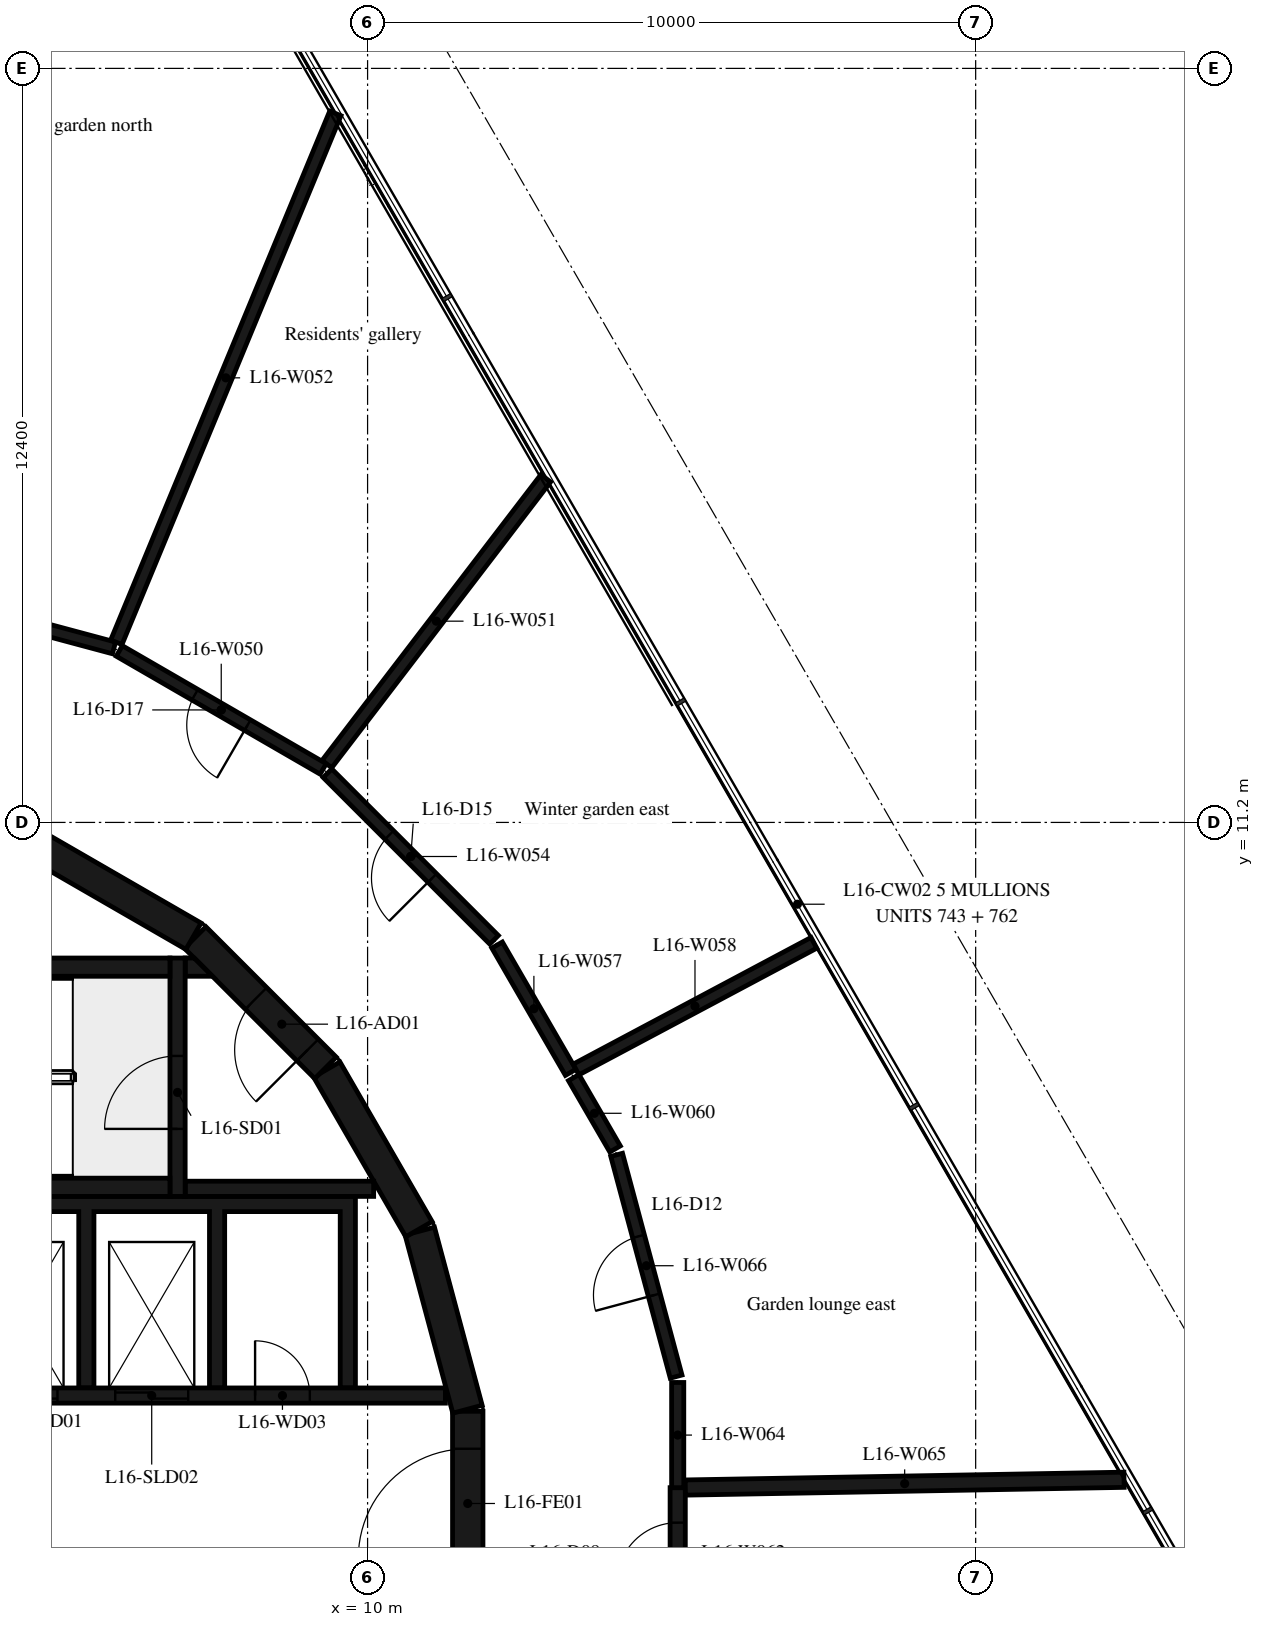
"""IFC4 building model, lengths in metres.
Left out: names, types, materials, properties, quantities, classifications, styles, units other than length and angle.
Written with IfcOpenShell. Run it as: python <this file> out.ifc"""

import sys

from ifc_helpers import new_model, si_unit, direction, frame, frame_2d, origin, place, context, subcontext, project, spatial, polyline, rectangle, outline, extrude, element, fill, save


model = new_model("IFC4")
c1 = context("Model", 3, precision=1e-05, world=origin(), true_north=direction((0.0, 1.0)))
c2 = subcontext(c1, "Body", "Model", "MODEL_VIEW")
j1 = project(units=[si_unit("LENGTHUNIT", "METRE"), si_unit("PLANEANGLEUNIT", "RADIAN")], contexts=[c1])
p1 = place(None, origin())
s1 = spatial("IfcSite", under=j1, at=p1, CompositionType="ELEMENT")
p2 = place(p1, origin())
s2 = spatial("IfcBuilding", under=s1, at=p2, CompositionType="ELEMENT")
p3 = place(p2, frame((0.0, 0.0, 69.9)))
s3 = spatial("IfcBuildingStorey", under=s2, at=p3, CompositionType="ELEMENT", Elevation=69.9)
p4 = place(p3, frame((11.647, -1.516, 0.0), z_axis=(0.0, 0.0, 1.0), x_axis=(0.0, 1.0, 0.0)))
e1 = element("IfcWall", 1, at=p4, inside=s3, PredefinedType="SHEAR", context=c2, shape_type="SweptSolid", body=[
    extrude(rectangle(XDim=3.033, YDim=0.5, at=frame_2d((1.516, 0.0))), origin(), (0.0, 0.0, 1.0), 6.35),
])
p5 = place(p4, frame((0.616, 0.0, 0.0)))
e2 = element("IfcOpeningElement", 2, at=p5, cuts=e1, PredefinedType="OPENING", context=c2, shape_type="SweptSolid", body=[
    extrude(rectangle(XDim=1.8, YDim=2.1, at=frame_2d((0.9, 1.05))), frame((0.0, 0.26, 0.0), z_axis=(0.0, -1.0, 0.0), x_axis=(1.0, 0.0, 0.0)), (0.0, 0.0, 1.0), 0.52),
])
for number, where, z_axis, x_axis in (
    (3, (11.643, 1.55, 0.0), (0.0, 0.0, 1.0), (-0.259, 0.966, 0.0)),
    (4, (10.845, 4.51, 0.0), (0.0, 0.0, 1.0), (-0.5, 0.866, 0.0)),
):
    element("IfcWall", number, at=place(p3, frame(where, z_axis=z_axis, x_axis=x_axis)), inside=s3, PredefinedType="SHEAR", context=c2, shape_type="SweptSolid", body=[
        extrude(rectangle(XDim=3.033, YDim=0.5, at=frame_2d((1.516, 0.0))), origin(), (0.0, 0.0, 1.0), 6.35),
    ])
p6 = place(p3, frame((9.308, 7.164, 0.0), z_axis=(0.0, 0.0, 1.0), x_axis=(-0.707106781187, 0.707106781187, 0.0)))
e5 = element("IfcWall", 5, at=p6, inside=s3, PredefinedType="SHEAR", context=c2, shape_type="SweptSolid", body=[
    extrude(rectangle(XDim=3.032, YDim=0.5, at=frame_2d((1.516, 0.0))), origin(), (0.0, 0.0, 1.0), 6.35),
])
p7 = place(p6, frame((0.416, 0.0, 0.0)))
e6 = element("IfcOpeningElement", 6, at=p7, cuts=e5, PredefinedType="OPENING", context=c2, shape_type="SweptSolid", body=[
    extrude(rectangle(XDim=1.2, YDim=2.1, at=frame_2d((0.6, 1.05))), frame((0.0, 0.26, 0.0), z_axis=(0.0, -1.0, 0.0), x_axis=(1.0, 0.0, 0.0)), (0.0, 0.0, 1.0), 0.52),
])
p8 = place(p3, frame((7.137, 9.329, 0.0), z_axis=(0.0, 0.0, 1.0), x_axis=(-0.865975092491, 0.500087131594, 0.0)))
e7 = element("IfcWall", 7, at=p8, inside=s3, PredefinedType="SHEAR", context=c2, shape_type="SweptSolid", body=[
    extrude(rectangle(XDim=3.033, YDim=0.5, at=frame_2d((1.516, 0.0))), origin(), (0.0, 0.0, 1.0), 6.35),
])
for number, where, z_axis, x_axis in (
    (8, (0.0, 5.2, 0.0), (0.0, 0.0, 1.0), (1.0, 0.0, 0.0)),
    (9, (0.0, 8.82, 0.0), (0.0, 0.0, 1.0), (1.0, 0.0, 0.0)),
):
    element("IfcWall", number, at=place(p3, frame(where, z_axis=z_axis, x_axis=x_axis)), inside=s3, PredefinedType="SHEAR", context=c2, shape_type="SweptSolid", body=[
        extrude(rectangle(XDim=6.75, YDim=0.3, at=frame_2d((3.375, 0.0))), origin(), (0.0, 0.0, 1.0), 6.35),
    ])
p9 = place(p3, frame((6.875, 5.05, 0.0), z_axis=(0.0, 0.0, 1.0), x_axis=(0.0, 1.0, 0.0)))
e10 = element("IfcWall", 10, at=p9, inside=s3, PredefinedType="SHEAR", context=c2, shape_type="SweptSolid", body=[
    extrude(rectangle(XDim=3.92, YDim=0.25, at=frame_2d((1.96, 0.0))), origin(), (0.0, 0.0, 1.0), 6.35),
])
p10 = place(p9, frame((1.11, 0.0, 0.0)))
e11 = element("IfcOpeningElement", 11, at=p10, cuts=e10, PredefinedType="OPENING", context=c2, shape_type="SweptSolid", body=[
    extrude(rectangle(XDim=1.2, YDim=2.1, at=frame_2d((0.6, 1.05))), frame((0.0, 0.135, 0.0), z_axis=(0.0, -1.0, 0.0), x_axis=(1.0, 0.0, 0.0)), (0.0, 0.0, 1.0), 0.27),
])
p11 = place(p3, frame((7.0, 5.175, 0.0), z_axis=(0.0, 0.0, 1.0), x_axis=(1.0, 0.0, 0.0)))
e12 = element("IfcWall", 12, at=p11, inside=s3, PredefinedType="SHEAR", context=c2, shape_type="SweptSolid", body=[
    extrude(rectangle(XDim=3.1, YDim=0.25, at=frame_2d((1.55, 0.0))), origin(), (0.0, 0.0, 1.0), 6.35),
])
p12 = place(p3, origin())
e13 = element("IfcWall", 13, at=p12, inside=s3, PredefinedType="SHEAR", context=c2, shape_type="SweptSolid", body=[
    extrude(outline(polyline([(7.448, 8.67), (7.0, 8.67), (7.0, 8.97), (7.148, 8.97), (7.448, 8.67)])), origin(), (0.0, 0.0, 1.0), 6.35),
])
p13 = place(p3, origin())
e14 = element("IfcWall", 14, at=p13, inside=s3, PredefinedType="SHEAR", context=c2, shape_type="SweptSolid", body=[
    extrude(outline(polyline([(-9.55, 4.8), (-7.65, 4.8), (-7.65, 1.9), (-7.4, 1.9), (-7.4, 4.8), (-5.5, 4.8), (-5.5, 1.9), (-5.25, 1.9), (-5.25, 4.8), (-3.35, 4.8), (-3.35, 1.9), (-3.1, 1.9), (-3.1, 4.8), (-1.2, 4.8), (-1.2, 1.9), (-0.95, 1.9), (-0.95, 4.8), (0.95, 4.8), (0.95, 1.9), (1.2, 1.9), (1.2, 4.8), (3.1, 4.8), (3.1, 1.9), (3.35, 1.9), (3.35, 4.8), (5.25, 4.8), (5.25, 1.9), (5.5, 1.9), (5.5, 4.8), (7.4, 4.8), (7.4, 1.9), (7.65, 1.9), (7.65, 4.8), (9.55, 4.8), (9.55, 1.9), (9.8, 1.9), (9.8, 4.8), (9.8, 5.05), (-9.8, 5.05), (-9.8, 4.8), (-9.8, 1.9), (-9.55, 1.9), (-9.55, 4.8)])), origin(), (0.0, 0.0, 1.0), 6.35),
])
p14 = place(p3, frame((3.35, 1.775, 0.0), z_axis=(0.0, 0.0, 1.0), x_axis=(1.0, 0.0, 0.0)))
e15 = element("IfcWall", 15, at=p14, inside=s3, PredefinedType="SHEAR", context=c2, shape_type="SweptSolid", body=[
    extrude(rectangle(XDim=7.93, YDim=0.25, at=frame_2d((3.965, 0.0))), origin(), (0.0, 0.0, 1.0), 6.35),
])
p15 = place(p14, frame((0.35, 0.0, 0.0)))
e16 = element("IfcOpeningElement", 16, at=p15, cuts=e15, PredefinedType="OPENING", context=c2, shape_type="SweptSolid", body=[
    extrude(rectangle(XDim=1.2, YDim=2.4, at=frame_2d((0.6, 1.2))), frame((0.0, 0.135, 0.0), z_axis=(0.0, -1.0, 0.0), x_axis=(1.0, 0.0, 0.0)), (0.0, 0.0, 1.0), 0.27),
])
p16 = place(p14, frame((2.5, 0.0, 0.0)))
e17 = element("IfcOpeningElement", 17, at=p16, cuts=e15, PredefinedType="OPENING", context=c2, shape_type="SweptSolid", body=[
    extrude(rectangle(XDim=1.2, YDim=2.4, at=frame_2d((0.6, 1.2))), frame((0.0, 0.135, 0.0), z_axis=(0.0, -1.0, 0.0), x_axis=(1.0, 0.0, 0.0)), (0.0, 0.0, 1.0), 0.27),
])
p17 = place(p14, frame((4.8, 0.0, 0.0)))
e18 = element("IfcOpeningElement", 18, at=p17, cuts=e15, PredefinedType="OPENING", context=c2, shape_type="SweptSolid", body=[
    extrude(rectangle(XDim=0.9, YDim=2.1, at=frame_2d((0.45, 1.05))), frame((0.0, 0.135, 0.0), z_axis=(0.0, -1.0, 0.0), x_axis=(1.0, 0.0, 0.0)), (0.0, 0.0, 1.0), 0.27),
])
p18 = place(p3, frame((5.83, 14.07, 0.0), z_axis=(0.0, 0.0, 1.0), x_axis=(-0.965870133458, 0.259026804199, 0.0)))
e19 = element("IfcWall", 19, at=p18, inside=s3, PredefinedType="PARTITIONING", context=c2, shape_type="SweptSolid", body=[
    extrude(rectangle(XDim=3.876, YDim=0.2, at=frame_2d((1.938, 0.0))), origin(), (0.0, 0.0, 1.0), 6.35),
])
p19 = place(p18, frame((1.438, 0.0, 0.0)))
e20 = element("IfcOpeningElement", 20, at=p19, cuts=e19, PredefinedType="OPENING", context=c2, shape_type="SweptSolid", body=[
    extrude(rectangle(XDim=1.0, YDim=2.1, at=frame_2d((0.5, 1.05))), frame((0.0, 0.11, 0.0), z_axis=(0.0, -1.0, 0.0), x_axis=(1.0, 0.0, 0.0)), (0.0, 0.0, 1.0), 0.22),
])
p20 = place(p3, frame((9.27, 12.08, 0.0), z_axis=(0.0, 0.0, 1.0), x_axis=(-0.865601686425, 0.500733182901, 0.0)))
e21 = element("IfcWall", 21, at=p20, inside=s3, PredefinedType="PARTITIONING", context=c2, shape_type="SweptSolid", body=[
    extrude(rectangle(XDim=3.874, YDim=0.2, at=frame_2d((1.937, 0.0))), origin(), (0.0, 0.0, 1.0), 6.35),
])
p21 = place(p20, frame((1.437, 0.0, 0.0)))
e22 = element("IfcOpeningElement", 22, at=p21, cuts=e21, PredefinedType="OPENING", context=c2, shape_type="SweptSolid", body=[
    extrude(rectangle(XDim=1.0, YDim=2.1, at=frame_2d((0.5, 1.05))), frame((0.0, 0.11, 0.0), z_axis=(0.0, -1.0, 0.0), x_axis=(1.0, 0.0, 0.0)), (0.0, 0.0, 1.0), 0.22),
])
p22 = place(p3, frame((9.331, 12.159, 0.0), z_axis=(0.0, 0.0, 1.0), x_axis=(0.607927563865, 0.793992491837, 0.0)))
e23 = element("IfcWall", 23, at=p22, inside=s3, PredefinedType="PARTITIONING", context=c2, shape_type="SweptSolid", body=[
    extrude(rectangle(XDim=5.92, YDim=0.2, at=frame_2d((2.96, 0.0))), origin(), (0.0, 0.0, 1.0), 6.35),
])
p23 = place(p3, frame((9.47, 22.86, 0.0), z_axis=(0.0, 0.0, 1.0), x_axis=(-0.382599926304, -0.923914117433, 0.0)))
e24 = element("IfcWall", 24, at=p23, inside=s3, PredefinedType="PARTITIONING", context=c2, shape_type="SweptSolid", body=[
    extrude(rectangle(XDim=9.414, YDim=0.2, at=frame_2d((4.707, 0.0))), origin(), (0.0, 0.0, 1.0), 6.35),
])
p24 = place(p3, frame((12.08, 9.27, 0.0), z_axis=(0.0, 0.0, 1.0), x_axis=(-0.707106781187, 0.707106781187, 0.0)))
e25 = element("IfcWall", 25, at=p24, inside=s3, PredefinedType="PARTITIONING", context=c2, shape_type="SweptSolid", body=[
    extrude(rectangle(XDim=3.874, YDim=0.2, at=frame_2d((1.937, 0.0))), origin(), (0.0, 0.0, 1.0), 6.35),
])
p25 = place(p24, frame((1.437, 0.0, 0.0)))
e26 = element("IfcOpeningElement", 26, at=p25, cuts=e25, PredefinedType="OPENING", context=c2, shape_type="SweptSolid", body=[
    extrude(rectangle(XDim=1.0, YDim=2.1, at=frame_2d((0.5, 1.05))), frame((0.0, 0.11, 0.0), z_axis=(0.0, -1.0, 0.0), x_axis=(1.0, 0.0, 0.0)), (0.0, 0.0, 1.0), 0.22),
])
p26 = place(p3, frame((13.34, 7.09, 0.0), z_axis=(0.0, 0.0, 1.0), x_axis=(-0.500439091614, 0.865771745661, 0.0)))
e27 = element("IfcWall", 27, at=p26, inside=s3, PredefinedType="PARTITIONING", context=c2, shape_type="SweptSolid", body=[
    extrude(rectangle(XDim=2.418, YDim=0.2, at=frame_2d((1.209, 0.0))), origin(), (0.0, 0.0, 1.0), 6.35),
])
p27 = place(p3, frame((13.428, 7.137, 0.0), z_axis=(0.0, 0.0, 1.0), x_axis=(0.882663829621, 0.470004855166, 0.0)))
e28 = element("IfcWall", 28, at=p27, inside=s3, PredefinedType="PARTITIONING", context=c2, shape_type="SweptSolid", body=[
    extrude(rectangle(XDim=4.432, YDim=0.2, at=frame_2d((2.216, 0.0))), origin(), (0.0, 0.0, 1.0), 6.35),
])
p28 = place(p3, frame((14.07, 5.83, 0.0), z_axis=(0.0, 0.0, 1.0), x_axis=(-0.501383964678, 0.865224895599, 0.0)))
e29 = element("IfcWall", 29, at=p28, inside=s3, PredefinedType="PARTITIONING", context=c2, shape_type="SweptSolid", body=[
    extrude(rectangle(XDim=1.356, YDim=0.2, at=frame_2d((0.678, 0.0))), origin(), (0.0, 0.0, 1.0), 6.35),
])
p29 = place(p3, frame((15.1, -1.89, 0.0), z_axis=(0.0, 0.0, 1.0), x_axis=(0.0, 1.0, 0.0)))
e30 = element("IfcWall", 30, at=p29, inside=s3, PredefinedType="PARTITIONING", context=c2, shape_type="SweptSolid", body=[
    extrude(rectangle(XDim=2.15, YDim=0.25, at=frame_2d((1.075, 0.0))), origin(), (0.0, 0.0, 1.0), 6.35),
])
p30 = place(p29, frame((0.575, 0.0, 0.0)))
e31 = element("IfcOpeningElement", 31, at=p30, cuts=e30, PredefinedType="OPENING", context=c2, shape_type="SweptSolid", body=[
    extrude(rectangle(XDim=1.0, YDim=2.1, at=frame_2d((0.5, 1.05))), frame((0.0, 0.135, 0.0), z_axis=(0.0, -1.0, 0.0), x_axis=(1.0, 0.0, 0.0)), (0.0, 0.0, 1.0), 0.27),
])
p31 = place(p3, frame((15.1, 0.26, 0.0), z_axis=(0.0, 0.0, 1.0), x_axis=(0.0, 1.0, 0.0)))
e32 = element("IfcWall", 32, at=p31, inside=s3, PredefinedType="PARTITIONING", context=c2, shape_type="SweptSolid", body=[
    extrude(rectangle(XDim=1.73, YDim=0.2, at=frame_2d((0.865, 0.0))), origin(), (0.0, 0.0, 1.0), 6.35),
])
p32 = place(p3, frame((15.225, 0.262, 0.0), z_axis=(0.0, 0.0, 1.0), x_axis=(0.99984343394, 0.017694846912, 0.0)))
e33 = element("IfcWall", 33, at=p32, inside=s3, PredefinedType="PARTITIONING", context=c2, shape_type="SweptSolid", body=[
    extrude(rectangle(XDim=7.216, YDim=0.25, at=frame_2d((3.608, 0.0))), origin(), (0.0, 0.0, 1.0), 6.35),
])
p33 = place(p3, frame((15.074, 2.087, 0.0), z_axis=(0.0, 0.0, 1.0), x_axis=(-0.259038819442, 0.965866911133, 0.0)))
e34 = element("IfcWall", 34, at=p33, inside=s3, PredefinedType="PARTITIONING", context=c2, shape_type="SweptSolid", body=[
    extrude(rectangle(XDim=3.776, YDim=0.2, at=frame_2d((1.888, 0.0))), origin(), (0.0, 0.0, 1.0), 6.35),
])
p34 = place(p33, frame((1.388, 0.0, 0.0)))
e35 = element("IfcOpeningElement", 35, at=p34, cuts=e34, PredefinedType="OPENING", context=c2, shape_type="SweptSolid", body=[
    extrude(rectangle(XDim=1.0, YDim=2.1, at=frame_2d((0.5, 1.05))), frame((0.0, 0.11, 0.0), z_axis=(0.0, -1.0, 0.0), x_axis=(1.0, 0.0, 0.0)), (0.0, 0.0, 1.0), 0.22),
])
p35 = place(p10, origin())
e36 = element("IfcDoor", 36, at=p35, inside=s3, OperationType="SINGLE_SWING_LEFT", PredefinedType="DOOR", context=c2, shape_type="SweptSolid", body=[
    extrude(rectangle(XDim=1.2, YDim=2.1, at=frame_2d((0.6, 1.05))), frame((0.0, 0.025, 0.0), z_axis=(0.0, -1.0, 0.0), x_axis=(1.0, 0.0, 0.0)), (0.0, 0.0, 1.0), 0.05),
])
fill(e11, e36)
p36 = place(p7, origin())
e37 = element("IfcDoor", 37, at=p36, inside=s3, OperationType="SINGLE_SWING_RIGHT", PredefinedType="DOOR", context=c2, shape_type="SweptSolid", body=[
    extrude(rectangle(XDim=1.2, YDim=2.1, at=frame_2d((0.6, 1.05))), frame((0.0, 0.025, 0.0), z_axis=(0.0, -1.0, 0.0), x_axis=(1.0, 0.0, 0.0)), (0.0, 0.0, 1.0), 0.05),
])
fill(e6, e37)
p37 = place(p5, origin())
e38 = element("IfcDoor", 38, at=p37, inside=s3, OperationType="DOUBLE_DOOR_SINGLE_SWING", PredefinedType="DOOR", context=c2, shape_type="SweptSolid", body=[
    extrude(rectangle(XDim=1.8, YDim=2.1, at=frame_2d((0.9, 1.05))), frame((0.0, 0.025, 0.0), z_axis=(0.0, -1.0, 0.0), x_axis=(1.0, 0.0, 0.0)), (0.0, 0.0, 1.0), 0.05),
])
fill(e2, e38)
p38 = place(p15, origin())
e39 = element("IfcDoor", 39, at=p38, inside=s3, OperationType="DOUBLE_DOOR_SLIDING", PredefinedType="DOOR", context=c2, shape_type="SweptSolid", body=[
    extrude(rectangle(XDim=1.2, YDim=2.4, at=frame_2d((0.6, 1.2))), frame((0.0, 0.025, 0.0), z_axis=(0.0, -1.0, 0.0), x_axis=(1.0, 0.0, 0.0)), (0.0, 0.0, 1.0), 0.05),
])
fill(e16, e39)
p39 = place(p16, origin())
e40 = element("IfcDoor", 40, at=p39, inside=s3, OperationType="DOUBLE_DOOR_SLIDING", PredefinedType="DOOR", context=c2, shape_type="SweptSolid", body=[
    extrude(rectangle(XDim=1.2, YDim=2.4, at=frame_2d((0.6, 1.2))), frame((0.0, 0.025, 0.0), z_axis=(0.0, -1.0, 0.0), x_axis=(1.0, 0.0, 0.0)), (0.0, 0.0, 1.0), 0.05),
])
fill(e17, e40)
p40 = place(p17, origin())
e41 = element("IfcDoor", 41, at=p40, inside=s3, OperationType="SINGLE_SWING_RIGHT", PredefinedType="DOOR", context=c2, shape_type="SweptSolid", body=[
    extrude(rectangle(XDim=0.9, YDim=2.1, at=frame_2d((0.45, 1.05))), frame((0.0, 0.025, 0.0), z_axis=(0.0, -1.0, 0.0), x_axis=(1.0, 0.0, 0.0)), (0.0, 0.0, 1.0), 0.05),
])
fill(e18, e41)
p41 = place(p30, origin())
e42 = element("IfcDoor", 42, at=p41, inside=s3, OperationType="SINGLE_SWING_LEFT", PredefinedType="DOOR", context=c2, shape_type="SweptSolid", body=[
    extrude(rectangle(XDim=1.0, YDim=2.1, at=frame_2d((0.5, 1.05))), frame((0.0, 0.025, 0.0), z_axis=(0.0, -1.0, 0.0), x_axis=(1.0, 0.0, 0.0)), (0.0, 0.0, 1.0), 0.05),
])
fill(e31, e42)
p42 = place(p34, origin())
e43 = element("IfcDoor", 43, at=p42, inside=s3, OperationType="SINGLE_SWING_LEFT", PredefinedType="DOOR", context=c2, shape_type="SweptSolid", body=[
    extrude(rectangle(XDim=1.0, YDim=2.1, at=frame_2d((0.5, 1.05))), frame((0.0, 0.025, 0.0), z_axis=(0.0, -1.0, 0.0), x_axis=(1.0, 0.0, 0.0)), (0.0, 0.0, 1.0), 0.05),
])
fill(e35, e43)
p43 = place(p25, origin())
e44 = element("IfcDoor", 44, at=p43, inside=s3, OperationType="SINGLE_SWING_LEFT", PredefinedType="DOOR", context=c2, shape_type="SweptSolid", body=[
    extrude(rectangle(XDim=1.0, YDim=2.1, at=frame_2d((0.5, 1.05))), frame((0.0, 0.025, 0.0), z_axis=(0.0, -1.0, 0.0), x_axis=(1.0, 0.0, 0.0)), (0.0, 0.0, 1.0), 0.05),
])
fill(e26, e44)
p44 = place(p21, origin())
e45 = element("IfcDoor", 45, at=p44, inside=s3, OperationType="SINGLE_SWING_LEFT", PredefinedType="DOOR", context=c2, shape_type="SweptSolid", body=[
    extrude(rectangle(XDim=1.0, YDim=2.1, at=frame_2d((0.5, 1.05))), frame((0.0, 0.025, 0.0), z_axis=(0.0, -1.0, 0.0), x_axis=(1.0, 0.0, 0.0)), (0.0, 0.0, 1.0), 0.05),
])
fill(e22, e45)
save(model, sys.argv[1])
